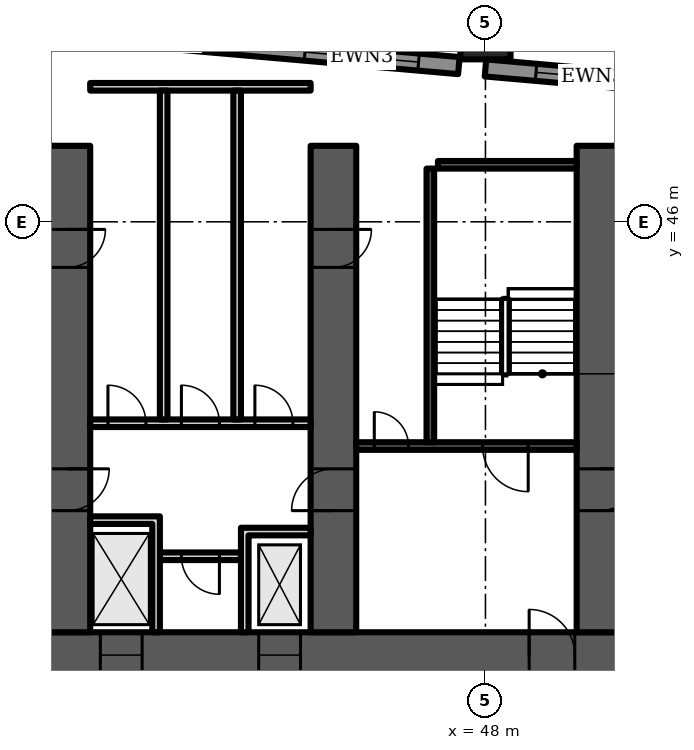
"""IFC4 building model, lengths in metres.
Left out: names, types, materials, properties, quantities, classifications, styles, units other than length and angle.
Written with IfcOpenShell. Run it as: python <this file> out.ifc"""

import sys

from ifc_helpers import new_model, si_unit, direction, frame, frame_2d, origin, origin_2d, place, context, subcontext, project, spatial, polyline, rectangle, outline, extrude, element, fill, save


model = new_model("IFC4")
c1 = context("Model", 3, precision=1e-05, world=origin(), true_north=direction((0.0, 1.0)))
c2 = subcontext(c1, "Body", "Model", "MODEL_VIEW")
j1 = project(units=[si_unit("LENGTHUNIT", "METRE"), si_unit("PLANEANGLEUNIT", "RADIAN")], contexts=[c1])
p1 = place(None, origin())
s1 = spatial("IfcSite", under=j1, at=p1, CompositionType="ELEMENT")
p2 = place(p1, origin())
s2 = spatial("IfcBuilding", under=s1, at=p2, CompositionType="ELEMENT")
p3 = place(p2, frame((0.0, 0.0, 21.5)))
s3 = spatial("IfcBuildingStorey", under=s2, at=p3, CompositionType="ELEMENT", Elevation=21.5)
p4 = place(p3, frame((48.0, 50.935, 0.0), z_axis=(0.0, 0.0, 1.0), x_axis=(1.0, 0.0, 0.0)))
e1 = element("IfcColumn", 1, at=p4, inside=s3, PredefinedType="COLUMN", context=c2, shape_type="SweptSolid", body=[
    extrude(rectangle(XDim=1.32, YDim=1.32, at=origin_2d()), origin(), (0.0, 0.0, 1.0), 6.0),
])
p5 = place(p3, frame((59.301, 49.06, 0.0), z_axis=(0.0, 0.0, 1.0), x_axis=(-0.996195, 0.087145, 0.0)))
e2 = element("IfcWall", 2, at=p5, inside=s3, PredefinedType="SOLIDWALL", context=c2, shape_type="SweptSolid", body=[
    extrude(rectangle(XDim=11.344, YDim=0.45, at=frame_2d((5.672, 0.0))), origin(), (0.0, 0.0, 1.0), 5.7),
])
p6 = place(p5, frame((1.336, 0.0, 1.0)))
e3 = element("IfcOpeningElement", 3, at=p6, cuts=e2, PredefinedType="OPENING", context=c2, shape_type="SweptSolid", body=[
    extrude(rectangle(XDim=3.0, YDim=3.7, at=frame_2d((1.5, 1.85))), frame((0.0, 0.235, 0.0), z_axis=(0.0, -1.0, 0.0), x_axis=(1.0, 0.0, 0.0)), (0.0, 0.0, 1.0), 0.47),
])
p7 = place(p5, frame((7.008, 0.0, 1.0)))
e4 = element("IfcOpeningElement", 4, at=p7, cuts=e2, PredefinedType="OPENING", context=c2, shape_type="SweptSolid", body=[
    extrude(rectangle(XDim=3.0, YDim=3.7, at=frame_2d((1.5, 1.85))), frame((0.0, 0.235, 0.0), z_axis=(0.0, -1.0, 0.0), x_axis=(1.0, 0.0, 0.0)), (0.0, 0.0, 1.0), 0.47),
])
p8 = place(p3, frame((47.301, 50.11, 0.0), z_axis=(0.0, 0.0, 1.0), x_axis=(-0.996195, 0.087143, 0.0)))
e5 = element("IfcWall", 5, at=p8, inside=s3, PredefinedType="SOLIDWALL", context=c2, shape_type="SweptSolid", body=[
    extrude(rectangle(XDim=10.26, YDim=0.45, at=frame_2d((5.13, 0.0))), origin(), (0.0, 0.0, 1.0), 5.7),
])
p9 = place(p8, frame((1.065, 0.0, 1.0)))
e6 = element("IfcOpeningElement", 6, at=p9, cuts=e5, PredefinedType="OPENING", context=c2, shape_type="SweptSolid", body=[
    extrude(rectangle(XDim=3.0, YDim=3.7, at=frame_2d((1.5, 1.85))), frame((0.0, 0.235, 0.0), z_axis=(0.0, -1.0, 0.0), x_axis=(1.0, 0.0, 0.0)), (0.0, 0.0, 1.0), 0.47),
])
p10 = place(p8, frame((6.195, 0.0, 1.0)))
e7 = element("IfcOpeningElement", 7, at=p10, cuts=e5, PredefinedType="OPENING", context=c2, shape_type="SweptSolid", body=[
    extrude(rectangle(XDim=3.0, YDim=3.7, at=frame_2d((1.5, 1.85))), frame((0.0, 0.235, 0.0), z_axis=(0.0, -1.0, 0.0), x_axis=(1.0, 0.0, 0.0)), (0.0, 0.0, 1.0), 0.47),
])
p11 = place(p3, frame((9.0, 34.6, 0.0), z_axis=(0.0, 0.0, 1.0), x_axis=(1.0, 0.0, 0.0)))
e8 = element("IfcWall", 8, at=p11, inside=s3, PredefinedType="SHEAR", context=c2, shape_type="SweptSolid", body=[
    extrude(rectangle(XDim=56.0, YDim=1.2, at=frame_2d((28.0, 0.0))), origin(), (0.0, 0.0, 1.0), 5.7),
])
p12 = place(p11, frame((2.0, 0.0, 0.0)))
e9 = element("IfcOpeningElement", 9, at=p12, cuts=e8, PredefinedType="OPENING", context=c2, shape_type="SweptSolid", body=[
    extrude(rectangle(XDim=1.0, YDim=2.1, at=frame_2d((0.5, 1.05))), frame((0.0, 0.61, 0.0), z_axis=(0.0, -1.0, 0.0), x_axis=(1.0, 0.0, 0.0)), (0.0, 0.0, 1.0), 1.22),
])
p13 = place(p11, frame((4.6, 0.0, 0.0)))
e10 = element("IfcOpeningElement", 10, at=p13, cuts=e8, PredefinedType="OPENING", context=c2, shape_type="SweptSolid", body=[
    extrude(rectangle(XDim=1.0, YDim=2.1, at=frame_2d((0.5, 1.05))), frame((0.0, 0.61, 0.0), z_axis=(0.0, -1.0, 0.0), x_axis=(1.0, 0.0, 0.0)), (0.0, 0.0, 1.0), 1.22),
])
p14 = place(p11, frame((7.867, 0.0, 0.0)))
e11 = element("IfcOpeningElement", 11, at=p14, cuts=e8, PredefinedType="OPENING", context=c2, shape_type="SweptSolid", body=[
    extrude(rectangle(XDim=1.1, YDim=2.1, at=frame_2d((0.55, 1.05))), frame((0.0, 0.61, 0.0), z_axis=(0.0, -1.0, 0.0), x_axis=(1.0, 0.0, 0.0)), (0.0, 0.0, 1.0), 1.22),
])
p15 = place(p11, frame((12.033, 0.0, 0.0)))
e12 = element("IfcOpeningElement", 12, at=p15, cuts=e8, PredefinedType="OPENING", context=c2, shape_type="SweptSolid", body=[
    extrude(rectangle(XDim=1.1, YDim=2.1, at=frame_2d((0.55, 1.05))), frame((0.0, 0.61, 0.0), z_axis=(0.0, -1.0, 0.0), x_axis=(1.0, 0.0, 0.0)), (0.0, 0.0, 1.0), 1.22),
])
p16 = place(p11, frame((9.8, 0.0, 0.0)))
e13 = element("IfcOpeningElement", 13, at=p16, cuts=e8, PredefinedType="OPENING", context=c2, shape_type="SweptSolid", body=[
    extrude(rectangle(XDim=1.4, YDim=2.1, at=frame_2d((0.7, 1.05))), frame((0.0, 0.61, 0.0), z_axis=(0.0, -1.0, 0.0), x_axis=(1.0, 0.0, 0.0)), (0.0, 0.0, 1.0), 1.22),
])
p17 = place(p11, frame((14.65, 0.0, 0.0)))
e14 = element("IfcOpeningElement", 14, at=p17, cuts=e8, PredefinedType="OPENING", context=c2, shape_type="SweptSolid", body=[
    extrude(rectangle(XDim=1.2, YDim=2.1, at=frame_2d((0.6, 1.05))), frame((0.0, 0.61, 0.0), z_axis=(0.0, -1.0, 0.0), x_axis=(1.0, 0.0, 0.0)), (0.0, 0.0, 1.0), 1.22),
])
p18 = place(p11, frame((21.867, 0.0, 0.0)))
e15 = element("IfcOpeningElement", 15, at=p18, cuts=e8, PredefinedType="OPENING", context=c2, shape_type="SweptSolid", body=[
    extrude(rectangle(XDim=1.1, YDim=2.1, at=frame_2d((0.55, 1.05))), frame((0.0, 0.61, 0.0), z_axis=(0.0, -1.0, 0.0), x_axis=(1.0, 0.0, 0.0)), (0.0, 0.0, 1.0), 1.22),
])
p19 = place(p11, frame((26.033, 0.0, 0.0)))
e16 = element("IfcOpeningElement", 16, at=p19, cuts=e8, PredefinedType="OPENING", context=c2, shape_type="SweptSolid", body=[
    extrude(rectangle(XDim=1.1, YDim=2.1, at=frame_2d((0.55, 1.05))), frame((0.0, 0.61, 0.0), z_axis=(0.0, -1.0, 0.0), x_axis=(1.0, 0.0, 0.0)), (0.0, 0.0, 1.0), 1.22),
])
p20 = place(p11, frame((23.8, 0.0, 0.0)))
e17 = element("IfcOpeningElement", 17, at=p20, cuts=e8, PredefinedType="OPENING", context=c2, shape_type="SweptSolid", body=[
    extrude(rectangle(XDim=1.4, YDim=2.1, at=frame_2d((0.7, 1.05))), frame((0.0, 0.61, 0.0), z_axis=(0.0, -1.0, 0.0), x_axis=(1.0, 0.0, 0.0)), (0.0, 0.0, 1.0), 1.22),
])
p21 = place(p11, frame((28.867, 0.0, 0.0)))
e18 = element("IfcOpeningElement", 18, at=p21, cuts=e8, PredefinedType="OPENING", context=c2, shape_type="SweptSolid", body=[
    extrude(rectangle(XDim=1.1, YDim=2.1, at=frame_2d((0.55, 1.05))), frame((0.0, 0.61, 0.0), z_axis=(0.0, -1.0, 0.0), x_axis=(1.0, 0.0, 0.0)), (0.0, 0.0, 1.0), 1.22),
])
p22 = place(p11, frame((33.033, 0.0, 0.0)))
e19 = element("IfcOpeningElement", 19, at=p22, cuts=e8, PredefinedType="OPENING", context=c2, shape_type="SweptSolid", body=[
    extrude(rectangle(XDim=1.1, YDim=2.1, at=frame_2d((0.55, 1.05))), frame((0.0, 0.61, 0.0), z_axis=(0.0, -1.0, 0.0), x_axis=(1.0, 0.0, 0.0)), (0.0, 0.0, 1.0), 1.22),
])
p23 = place(p11, frame((40.15, 0.0, 0.0)))
e20 = element("IfcOpeningElement", 20, at=p23, cuts=e8, PredefinedType="OPENING", context=c2, shape_type="SweptSolid", body=[
    extrude(rectangle(XDim=1.2, YDim=2.1, at=frame_2d((0.6, 1.05))), frame((0.0, 0.61, 0.0), z_axis=(0.0, -1.0, 0.0), x_axis=(1.0, 0.0, 0.0)), (0.0, 0.0, 1.0), 1.22),
])
p24 = place(p11, frame((44.8, 0.0, 0.0)))
e21 = element("IfcOpeningElement", 21, at=p24, cuts=e8, PredefinedType="OPENING", context=c2, shape_type="SweptSolid", body=[
    extrude(rectangle(XDim=1.4, YDim=2.1, at=frame_2d((0.7, 1.05))), frame((0.0, 0.61, 0.0), z_axis=(0.0, -1.0, 0.0), x_axis=(1.0, 0.0, 0.0)), (0.0, 0.0, 1.0), 1.22),
])
p25 = place(p11, frame((49.867, 0.0, 0.0)))
e22 = element("IfcOpeningElement", 22, at=p25, cuts=e8, PredefinedType="OPENING", context=c2, shape_type="SweptSolid", body=[
    extrude(rectangle(XDim=1.1, YDim=2.1, at=frame_2d((0.55, 1.05))), frame((0.0, 0.61, 0.0), z_axis=(0.0, -1.0, 0.0), x_axis=(1.0, 0.0, 0.0)), (0.0, 0.0, 1.0), 1.22),
])
p26 = place(p11, frame((53.5, 0.0, 0.0)))
e23 = element("IfcOpeningElement", 23, at=p26, cuts=e8, PredefinedType="OPENING", context=c2, shape_type="SweptSolid", body=[
    extrude(rectangle(XDim=1.1, YDim=2.1, at=frame_2d((0.55, 1.05))), frame((0.0, 0.61, 0.0), z_axis=(0.0, -1.0, 0.0), x_axis=(1.0, 0.0, 0.0)), (0.0, 0.0, 1.0), 1.22),
])
p27 = place(p11, frame((51.567, 0.0, 0.0)))
e24 = element("IfcOpeningElement", 24, at=p27, cuts=e8, PredefinedType="OPENING", context=c2, shape_type="SweptSolid", body=[
    extrude(rectangle(XDim=1.4, YDim=2.1, at=frame_2d((0.7, 1.05))), frame((0.0, 0.61, 0.0), z_axis=(0.0, -1.0, 0.0), x_axis=(1.0, 0.0, 0.0)), (0.0, 0.0, 1.0), 1.22),
])
p28 = place(p3, frame((37.0, 35.2, 0.0), z_axis=(0.0, 0.0, 1.0), x_axis=(0.0, 1.0, 0.0)))
e25 = element("IfcWall", 25, at=p28, inside=s3, PredefinedType="SHEAR", context=c2, shape_type="SweptSolid", body=[
    extrude(rectangle(XDim=12.8, YDim=1.2, at=frame_2d((6.4, 0.0))), origin(), (0.0, 0.0, 1.0), 5.7),
])
p29 = place(p28, frame((3.2, 0.0, 0.0)))
e26 = element("IfcOpeningElement", 26, at=p29, cuts=e25, PredefinedType="OPENING", context=c2, shape_type="SweptSolid", body=[
    extrude(rectangle(XDim=1.1, YDim=2.1, at=frame_2d((0.55, 1.05))), frame((0.0, 0.61, 0.0), z_axis=(0.0, -1.0, 0.0), x_axis=(1.0, 0.0, 0.0)), (0.0, 0.0, 1.0), 1.22),
])
p30 = place(p28, frame((9.6, 0.0, 0.0)))
e27 = element("IfcOpeningElement", 27, at=p30, cuts=e25, PredefinedType="OPENING", context=c2, shape_type="SweptSolid", body=[
    extrude(rectangle(XDim=1.0, YDim=2.1, at=frame_2d((0.5, 1.05))), frame((0.0, 0.61, 0.0), z_axis=(0.0, -1.0, 0.0), x_axis=(1.0, 0.0, 0.0)), (0.0, 0.0, 1.0), 1.22),
])
p31 = place(p3, frame((44.0, 35.2, 0.0), z_axis=(0.0, 0.0, 1.0), x_axis=(0.0, 1.0, 0.0)))
e28 = element("IfcWall", 28, at=p31, inside=s3, PredefinedType="SHEAR", context=c2, shape_type="SweptSolid", body=[
    extrude(rectangle(XDim=12.8, YDim=1.2, at=frame_2d((6.4, 0.0))), origin(), (0.0, 0.0, 1.0), 5.7),
])
p32 = place(p31, frame((3.2, 0.0, 0.0)))
e29 = element("IfcOpeningElement", 29, at=p32, cuts=e28, PredefinedType="OPENING", context=c2, shape_type="SweptSolid", body=[
    extrude(rectangle(XDim=1.1, YDim=2.1, at=frame_2d((0.55, 1.05))), frame((0.0, 0.61, 0.0), z_axis=(0.0, -1.0, 0.0), x_axis=(1.0, 0.0, 0.0)), (0.0, 0.0, 1.0), 1.22),
])
p33 = place(p31, frame((9.6, 0.0, 0.0)))
e30 = element("IfcOpeningElement", 30, at=p33, cuts=e28, PredefinedType="OPENING", context=c2, shape_type="SweptSolid", body=[
    extrude(rectangle(XDim=1.0, YDim=2.1, at=frame_2d((0.5, 1.05))), frame((0.0, 0.61, 0.0), z_axis=(0.0, -1.0, 0.0), x_axis=(1.0, 0.0, 0.0)), (0.0, 0.0, 1.0), 1.22),
])
p34 = place(p3, frame((51.0, 35.2, 0.0), z_axis=(0.0, 0.0, 1.0), x_axis=(0.0, 1.0, 0.0)))
e31 = element("IfcWall", 31, at=p34, inside=s3, PredefinedType="SHEAR", context=c2, shape_type="SweptSolid", body=[
    extrude(rectangle(XDim=12.8, YDim=1.2, at=frame_2d((6.4, 0.0))), origin(), (0.0, 0.0, 1.0), 5.7),
])
p35 = place(p34, frame((3.2, 0.0, 0.0)))
e32 = element("IfcOpeningElement", 32, at=p35, cuts=e31, PredefinedType="OPENING", context=c2, shape_type="SweptSolid", body=[
    extrude(rectangle(XDim=1.1, YDim=2.1, at=frame_2d((0.55, 1.05))), frame((0.0, 0.61, 0.0), z_axis=(0.0, -1.0, 0.0), x_axis=(1.0, 0.0, 0.0)), (0.0, 0.0, 1.0), 1.22),
])
p36 = place(p3, frame((39.433, 37.2, 0.0), z_axis=(0.0, 0.0, 1.0), x_axis=(1.0, 0.0, 0.0)))
e33 = element("IfcWall", 33, at=p36, inside=s3, PredefinedType="PARTITIONING", context=c2, shape_type="SweptSolid", body=[
    extrude(rectangle(XDim=2.133, YDim=0.2, at=frame_2d((1.067, 0.0))), origin(), (0.0, 0.0, 1.0), 5.7),
])
p37 = place(p36, frame((0.567, 0.0, 0.0)))
e34 = element("IfcOpeningElement", 34, at=p37, cuts=e33, PredefinedType="OPENING", context=c2, shape_type="SweptSolid", body=[
    extrude(rectangle(XDim=1.0, YDim=2.1, at=frame_2d((0.5, 1.05))), frame((0.0, 0.11, 0.0), z_axis=(0.0, -1.0, 0.0), x_axis=(1.0, 0.0, 0.0)), (0.0, 0.0, 1.0), 0.22),
])
p38 = place(p3, frame((37.6, 40.7, 0.0), z_axis=(0.0, 0.0, 1.0), x_axis=(1.0, 0.0, 0.0)))
e35 = element("IfcWall", 35, at=p38, inside=s3, PredefinedType="PARTITIONING", context=c2, shape_type="SweptSolid", body=[
    extrude(rectangle(XDim=5.8, YDim=0.2, at=frame_2d((2.9, 0.0))), origin(), (0.0, 0.0, 1.0), 5.7),
])
p39 = place(p38, frame((0.467, 0.0, 0.0)))
e36 = element("IfcOpeningElement", 36, at=p39, cuts=e35, PredefinedType="OPENING", context=c2, shape_type="SweptSolid", body=[
    extrude(rectangle(XDim=1.0, YDim=2.1, at=frame_2d((0.5, 1.05))), frame((0.0, 0.11, 0.0), z_axis=(0.0, -1.0, 0.0), x_axis=(1.0, 0.0, 0.0)), (0.0, 0.0, 1.0), 0.22),
])
p40 = place(p38, frame((2.4, 0.0, 0.0)))
e37 = element("IfcOpeningElement", 37, at=p40, cuts=e35, PredefinedType="OPENING", context=c2, shape_type="SweptSolid", body=[
    extrude(rectangle(XDim=1.0, YDim=2.1, at=frame_2d((0.5, 1.05))), frame((0.0, 0.11, 0.0), z_axis=(0.0, -1.0, 0.0), x_axis=(1.0, 0.0, 0.0)), (0.0, 0.0, 1.0), 0.22),
])
p41 = place(p38, frame((4.333, 0.0, 0.0)))
e38 = element("IfcOpeningElement", 38, at=p41, cuts=e35, PredefinedType="OPENING", context=c2, shape_type="SweptSolid", body=[
    extrude(rectangle(XDim=1.0, YDim=2.1, at=frame_2d((0.5, 1.05))), frame((0.0, 0.11, 0.0), z_axis=(0.0, -1.0, 0.0), x_axis=(1.0, 0.0, 0.0)), (0.0, 0.0, 1.0), 0.22),
])
p42 = place(p3, frame((0.0, 0.0, -0.0)))
e39 = element("IfcWall", 39, at=p42, inside=s3, PredefinedType="PARTITIONING", context=c2, shape_type="SweptSolid", body=[
    extrude(outline(polyline([(41.567, 37.95), (41.767, 37.95), (43.4, 37.95), (43.4, 37.75), (41.767, 37.75), (41.767, 35.2), (41.567, 35.2), (41.567, 37.95)])), origin(), (0.0, 0.0, 1.0), 5.7),
])
p43 = place(p3, frame((0.0, 0.0, -0.0)))
e40 = element("IfcWall", 40, at=p43, inside=s3, PredefinedType="PARTITIONING", context=c2, shape_type="SweptSolid", body=[
    extrude(outline(polyline([(39.233, 38.05), (37.6, 38.05), (37.6, 38.25), (39.233, 38.25), (39.433, 38.25), (39.433, 35.2), (39.233, 35.2), (39.233, 38.05)])), origin(), (0.0, 0.0, 1.0), 5.7),
])
p44 = place(p3, frame((37.6, 49.552, 0.0), z_axis=(0.0, 0.0, 1.0), x_axis=(1.0, 0.0, 0.0)))
e41 = element("IfcWall", 41, at=p44, inside=s3, PredefinedType="PARTITIONING", context=c2, shape_type="SweptSolid", body=[
    extrude(rectangle(XDim=5.8, YDim=0.2, at=frame_2d((2.9, 0.0))), origin(), (0.0, 0.0, 1.0), 5.7),
])
for number, where, z_axis, x_axis in (
    (42, (39.533, 40.8, 0.0), (0.0, 0.0, 1.0), (0.0, 1.0, 0.0)),
    (43, (41.467, 40.8, 0.0), (0.0, 0.0, 1.0), (0.0, 1.0, 0.0)),
):
    element("IfcWall", number, at=place(p3, frame(where, z_axis=z_axis, x_axis=x_axis)), inside=s3, PredefinedType="PARTITIONING", context=c2, shape_type="SweptSolid", body=[
        extrude(rectangle(XDim=8.653, YDim=0.2, at=frame_2d((4.326, 0.0))), origin(), (0.0, 0.0, 1.0), 5.7),
    ])
p45 = place(p3, frame((44.6, 40.1, 0.0), z_axis=(0.0, 0.0, 1.0), x_axis=(1.0, 0.0, 0.0)))
e44 = element("IfcWall", 44, at=p45, inside=s3, PredefinedType="SHEAR", context=c2, shape_type="SweptSolid", body=[
    extrude(rectangle(XDim=5.8, YDim=0.2, at=frame_2d((2.9, 0.0))), origin(), (0.0, 0.0, 1.0), 5.7),
])
p46 = place(p45, frame((3.325, 0.0, 0.0)))
e45 = element("IfcOpeningElement", 45, at=p46, cuts=e44, PredefinedType="OPENING", context=c2, shape_type="SweptSolid", body=[
    extrude(rectangle(XDim=1.2, YDim=2.1, at=frame_2d((0.6, 1.05))), frame((0.0, 0.11, 0.0), z_axis=(0.0, -1.0, 0.0), x_axis=(1.0, 0.0, 0.0)), (0.0, 0.0, 1.0), 0.22),
])
p47 = place(p45, frame((0.475, 0.0, 0.0)))
e46 = element("IfcOpeningElement", 46, at=p47, cuts=e44, PredefinedType="OPENING", context=c2, shape_type="SweptSolid", body=[
    extrude(rectangle(XDim=0.9, YDim=2.1, at=frame_2d((0.45, 1.05))), frame((0.0, 0.11, 0.0), z_axis=(0.0, -1.0, 0.0), x_axis=(1.0, 0.0, 0.0)), (0.0, 0.0, 1.0), 0.22),
])
p48 = place(p3, frame((46.55, 40.2, 0.0), z_axis=(0.0, 0.0, 1.0), x_axis=(0.0, 1.0, 0.0)))
e47 = element("IfcWall", 47, at=p48, inside=s3, PredefinedType="SHEAR", context=c2, shape_type="SweptSolid", body=[
    extrude(rectangle(XDim=7.2, YDim=0.2, at=frame_2d((3.6, 0.0))), origin(), (0.0, 0.0, 1.0), 5.7),
])
p49 = place(p3, frame((46.75, 47.5, 0.0), z_axis=(0.0, 0.0, 1.0), x_axis=(1.0, 0.0, 0.0)))
e48 = element("IfcWall", 48, at=p49, inside=s3, PredefinedType="SHEAR", context=c2, shape_type="SweptSolid", body=[
    extrude(rectangle(XDim=3.65, YDim=0.2, at=frame_2d((1.825, 0.0))), origin(), (0.0, 0.0, 1.0), 5.7),
])
p50 = place(p7, origin())
e49 = element("IfcWindow", 49, at=p50, inside=s3, PartitioningType="SINGLE_PANEL", PredefinedType="WINDOW", context=c2, shape_type="SweptSolid", body=[
    extrude(rectangle(XDim=3.0, YDim=3.7, at=frame_2d((1.5, 1.85))), frame((0.0, 0.105, 0.0), z_axis=(0.0, -1.0, 0.0), x_axis=(1.0, 0.0, 0.0)), (0.0, 0.0, 1.0), 0.06),
])
fill(e4, e49)
p51 = place(p9, origin())
e50 = element("IfcWindow", 50, at=p51, inside=s3, PartitioningType="SINGLE_PANEL", PredefinedType="WINDOW", context=c2, shape_type="SweptSolid", body=[
    extrude(rectangle(XDim=3.0, YDim=3.7, at=frame_2d((1.5, 1.85))), frame((0.0, 0.105, 0.0), z_axis=(0.0, -1.0, 0.0), x_axis=(1.0, 0.0, 0.0)), (0.0, 0.0, 1.0), 0.06),
])
fill(e6, e50)
p52 = place(p37, origin())
e51 = element("IfcDoor", 51, at=p52, inside=s3, OperationType="SINGLE_SWING_RIGHT", PredefinedType="DOOR", context=c2, shape_type="SweptSolid", body=[
    extrude(rectangle(XDim=1.0, YDim=2.1, at=frame_2d((0.5, 1.05))), frame((0.0, 0.025, 0.0), z_axis=(0.0, -1.0, 0.0), x_axis=(1.0, 0.0, 0.0)), (0.0, 0.0, 1.0), 0.05),
])
fill(e34, e51)
p53 = place(p21, origin())
e52 = element("IfcDoor", 52, at=p53, inside=s3, OperationType="DOUBLE_DOOR_SLIDING", PredefinedType="DOOR", context=c2, shape_type="SweptSolid", body=[
    extrude(rectangle(XDim=1.1, YDim=2.1, at=frame_2d((0.55, 1.05))), frame((0.0, 0.025, 0.0), z_axis=(0.0, -1.0, 0.0), x_axis=(1.0, 0.0, 0.0)), (0.0, 0.0, 1.0), 0.05),
])
fill(e18, e52)
p54 = place(p22, origin())
e53 = element("IfcDoor", 53, at=p54, inside=s3, OperationType="DOUBLE_DOOR_SLIDING", PredefinedType="DOOR", context=c2, shape_type="SweptSolid", body=[
    extrude(rectangle(XDim=1.1, YDim=2.1, at=frame_2d((0.55, 1.05))), frame((0.0, 0.025, 0.0), z_axis=(0.0, -1.0, 0.0), x_axis=(1.0, 0.0, 0.0)), (0.0, 0.0, 1.0), 0.05),
])
fill(e19, e53)
p55 = place(p39, origin())
e54 = element("IfcDoor", 54, at=p55, inside=s3, OperationType="SINGLE_SWING_LEFT", PredefinedType="DOOR", context=c2, shape_type="SweptSolid", body=[
    extrude(rectangle(XDim=1.0, YDim=2.1, at=frame_2d((0.5, 1.05))), frame((0.0, 0.025, 0.0), z_axis=(0.0, -1.0, 0.0), x_axis=(1.0, 0.0, 0.0)), (0.0, 0.0, 1.0), 0.05),
])
fill(e36, e54)
p56 = place(p40, origin())
e55 = element("IfcDoor", 55, at=p56, inside=s3, OperationType="SINGLE_SWING_LEFT", PredefinedType="DOOR", context=c2, shape_type="SweptSolid", body=[
    extrude(rectangle(XDim=1.0, YDim=2.1, at=frame_2d((0.5, 1.05))), frame((0.0, 0.025, 0.0), z_axis=(0.0, -1.0, 0.0), x_axis=(1.0, 0.0, 0.0)), (0.0, 0.0, 1.0), 0.05),
])
fill(e37, e55)
p57 = place(p41, origin())
e56 = element("IfcDoor", 56, at=p57, inside=s3, OperationType="SINGLE_SWING_LEFT", PredefinedType="DOOR", context=c2, shape_type="SweptSolid", body=[
    extrude(rectangle(XDim=1.0, YDim=2.1, at=frame_2d((0.5, 1.05))), frame((0.0, 0.025, 0.0), z_axis=(0.0, -1.0, 0.0), x_axis=(1.0, 0.0, 0.0)), (0.0, 0.0, 1.0), 0.05),
])
fill(e38, e56)
p58 = place(p46, origin())
e57 = element("IfcDoor", 57, at=p58, inside=s3, OperationType="SINGLE_SWING_RIGHT", PredefinedType="DOOR", context=c2, shape_type="SweptSolid", body=[
    extrude(rectangle(XDim=1.2, YDim=2.1, at=frame_2d((0.6, 1.05))), frame((0.0, 0.025, 0.0), z_axis=(0.0, -1.0, 0.0), x_axis=(1.0, 0.0, 0.0)), (0.0, 0.0, 1.0), 0.05),
])
fill(e45, e57)
p59 = place(p47, origin())
e58 = element("IfcDoor", 58, at=p59, inside=s3, OperationType="SINGLE_SWING_LEFT", PredefinedType="DOOR", context=c2, shape_type="SweptSolid", body=[
    extrude(rectangle(XDim=0.9, YDim=2.1, at=frame_2d((0.45, 1.05))), frame((0.0, 0.025, 0.0), z_axis=(0.0, -1.0, 0.0), x_axis=(1.0, 0.0, 0.0)), (0.0, 0.0, 1.0), 0.05),
])
fill(e46, e58)
p60 = place(p23, origin())
e59 = element("IfcDoor", 59, at=p60, inside=s3, OperationType="SINGLE_SWING_LEFT", PredefinedType="DOOR", context=c2, shape_type="SweptSolid", body=[
    extrude(rectangle(XDim=1.2, YDim=2.1, at=frame_2d((0.6, 1.05))), frame((0.0, 0.025, 0.0), z_axis=(0.0, -1.0, 0.0), x_axis=(1.0, 0.0, 0.0)), (0.0, 0.0, 1.0), 0.05),
])
fill(e20, e59)
p61 = place(p29, origin())
e60 = element("IfcDoor", 60, at=p61, inside=s3, OperationType="SINGLE_SWING_RIGHT", PredefinedType="DOOR", context=c2, shape_type="SweptSolid", body=[
    extrude(rectangle(XDim=1.1, YDim=2.1, at=frame_2d((0.55, 1.05))), frame((0.0, 0.025, 0.0), z_axis=(0.0, -1.0, 0.0), x_axis=(1.0, 0.0, 0.0)), (0.0, 0.0, 1.0), 0.05),
])
fill(e26, e60)
p62 = place(p30, origin())
e61 = element("IfcDoor", 61, at=p62, inside=s3, OperationType="SINGLE_SWING_RIGHT", PredefinedType="DOOR", context=c2, shape_type="SweptSolid", body=[
    extrude(rectangle(XDim=1.0, YDim=2.1, at=frame_2d((0.5, 1.05))), frame((0.0, 0.6, 0.0), z_axis=(0.0, -1.0, 0.0), x_axis=(1.0, 0.0, 0.0)), (0.0, 0.0, 1.0), 1.199),
])
fill(e27, e61)
p63 = place(p32, origin())
e62 = element("IfcDoor", 62, at=p63, inside=s3, OperationType="SINGLE_SWING_LEFT", PredefinedType="DOOR", context=c2, shape_type="SweptSolid", body=[
    extrude(rectangle(XDim=1.1, YDim=2.1, at=frame_2d((0.55, 1.05))), frame((0.0, 0.025, 0.0), z_axis=(0.0, -1.0, 0.0), x_axis=(1.0, 0.0, 0.0)), (0.0, 0.0, 1.0), 0.05),
])
fill(e29, e62)
p64 = place(p33, origin())
e63 = element("IfcDoor", 63, at=p64, inside=s3, OperationType="SINGLE_SWING_RIGHT", PredefinedType="DOOR", context=c2, shape_type="SweptSolid", body=[
    extrude(rectangle(XDim=1.0, YDim=2.1, at=frame_2d((0.5, 1.05))), frame((0.0, 0.6, 0.0), z_axis=(0.0, -1.0, 0.0), x_axis=(1.0, 0.0, 0.0)), (0.0, 0.0, 1.0), 1.199),
])
fill(e30, e63)
p65 = place(p35, origin())
e64 = element("IfcDoor", 64, at=p65, inside=s3, OperationType="SINGLE_SWING_RIGHT", PredefinedType="DOOR", context=c2, shape_type="SweptSolid", body=[
    extrude(rectangle(XDim=1.1, YDim=2.1, at=frame_2d((0.55, 1.05))), frame((0.0, 0.025, 0.0), z_axis=(0.0, -1.0, 0.0), x_axis=(1.0, 0.0, 0.0)), (0.0, 0.0, 1.0), 0.05),
])
fill(e32, e64)
save(model, sys.argv[1])
